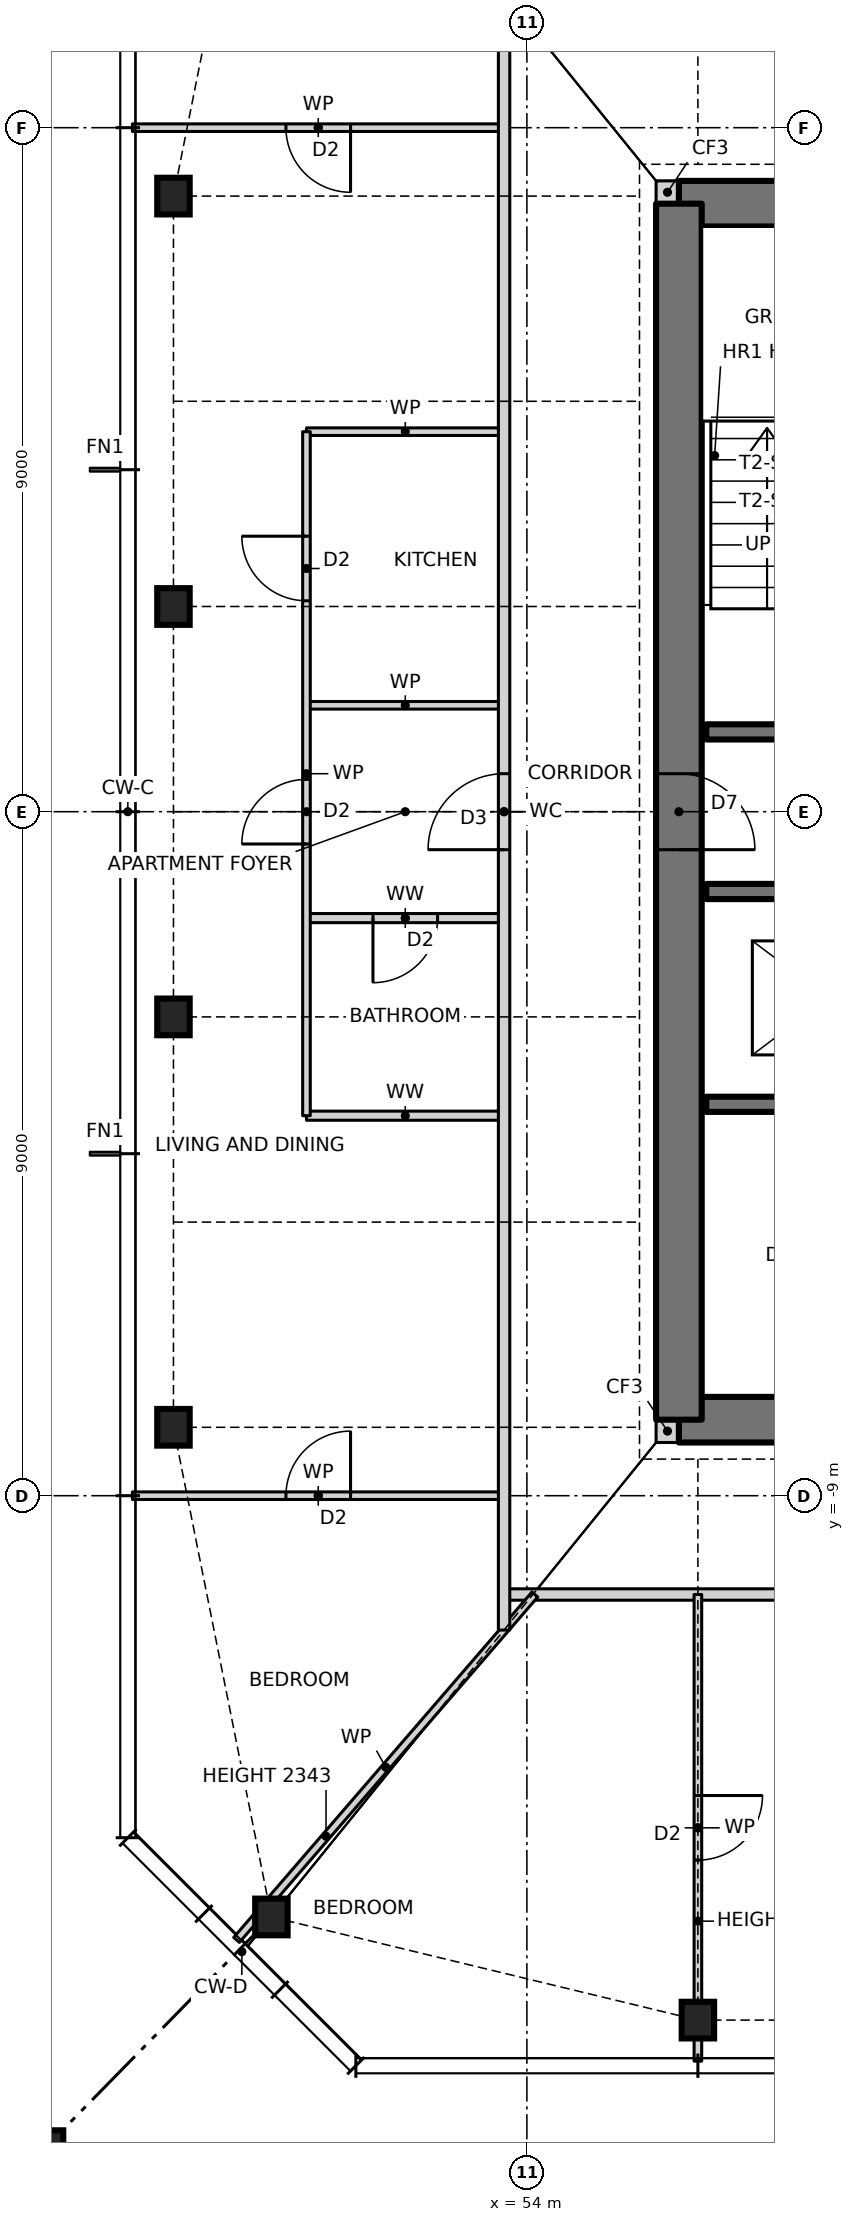
"""IFC4 building model, lengths in metres.
Left out: names, types, materials, properties, quantities, classifications, styles, units other than length and angle.
Written with IfcOpenShell. Run it as: python <this file> out.ifc"""

import sys

from ifc_helpers import new_model, si_unit, direction, frame, frame_2d, origin, origin_2d, place, context, subcontext, project, spatial, rectangle, hollow_rectangle, i_section, extrude, element, fill, save


model = new_model("IFC4")
c1 = context("Model", 3, precision=1e-05, world=origin(), true_north=direction((0.0, 1.0)))
c2 = subcontext(c1, "Body", "Model", "MODEL_VIEW")
j1 = project(units=[si_unit("LENGTHUNIT", "METRE"), si_unit("PLANEANGLEUNIT", "RADIAN")], contexts=[c1])
p1 = place(None, origin())
s1 = spatial("IfcSite", under=j1, at=p1, CompositionType="ELEMENT")
p2 = place(p1, origin())
s2 = spatial("IfcBuilding", under=s1, at=p2, CompositionType="ELEMENT")
p3 = place(p2, frame((0.0, 0.0, 94.5)))
s3 = spatial("IfcBuildingStorey", under=s2, at=p3, CompositionType="ELEMENT", Elevation=94.5)
for number, where, z_axis, x_axis in (
    (1, (50.639, -14.543, 0.0), (0.0, 0.0, 1.0), (1.0, 0.0, 0.0)),
    (2, (56.25, -15.9, 0.0), (0.0, 0.0, 1.0), (1.0, 0.0, 0.0)),
    (3, (49.35, 8.1, 0.0), (0.0, 0.0, 1.0), (1.0, 0.0, 0.0)),
    (4, (49.35, 2.7, 0.0), (0.0, 0.0, 1.0), (1.0, 0.0, 0.0)),
    (5, (49.35, -2.7, 0.0), (0.0, 0.0, 1.0), (1.0, 0.0, 0.0)),
    (6, (49.35, -8.1, 0.0), (0.0, 0.0, 1.0), (1.0, 0.0, 0.0)),
):
    element("IfcColumn", number, at=place(p3, frame(where, z_axis=z_axis, x_axis=x_axis)), inside=s3, PredefinedType="COLUMN", context=c2, shape_type="SweptSolid", body=[
        extrude(i_section(OverallWidth=0.427, OverallDepth=0.483, WebThickness=0.051, FlangeThickness=0.082, at=origin_2d()), origin(), (0.0, 0.0, 1.0), 3.5),
    ])
p4 = place(p3, frame((47.35, -17.9, 0.0), z_axis=(0.0, 0.0, 1.0), x_axis=(1.0, 0.0, 0.0)))
e7 = element("IfcColumn", 7, at=p4, inside=s3, PredefinedType="COLUMN", context=c2, shape_type="SweptSolid", body=[
    extrude(hollow_rectangle(XDim=1.1, YDim=1.1, WallThickness=0.06, at=origin_2d()), origin(), (0.0, 0.0, 1.0), 3.5),
])
for number, where, z_axis, x_axis in (
    (8, (55.7, -8.15, 0.0), (0.0, 0.0, 1.0), (1.0, 0.0, 0.0)),
    (9, (55.7, 8.15, 0.0), (0.0, 0.0, 1.0), (1.0, 0.0, 0.0)),
):
    element("IfcWall", number, at=place(p3, frame(where, z_axis=z_axis, x_axis=x_axis)), inside=s3, PredefinedType="SOLIDWALL", context=c2, shape_type="SweptSolid", body=[
        extrude(rectangle(XDim=0.3, YDim=0.3, at=frame_2d((0.15, 0.0))), origin(), (0.0, 0.0, 1.0), 3.5),
    ])
p5 = place(p3, frame((56.0, -8.0, 0.0), z_axis=(0.0, 0.0, 1.0), x_axis=(1.0, 0.0, 0.0)))
e10 = element("IfcWall", 10, at=p5, inside=s3, PredefinedType="SHEAR", context=c2, shape_type="SweptSolid", body=[
    extrude(rectangle(XDim=14.0, YDim=0.6, at=frame_2d((7.0, 0.0))), origin(), (0.0, 0.0, 1.0), 3.5),
])
p6 = place(p5, frame((2.7, 0.0, 0.0)))
e11 = element("IfcOpeningElement", 11, at=p6, cuts=e10, PredefinedType="OPENING", context=c2, shape_type="SweptSolid", body=[
    extrude(rectangle(XDim=0.9, YDim=2.1, at=frame_2d((0.45, 1.05))), frame((0.0, 0.31, 0.0), z_axis=(0.0, -1.0, 0.0), x_axis=(1.0, 0.0, 0.0)), (0.0, 0.0, 1.0), 0.62),
])
p7 = place(p5, frame((7.7, 0.0, 0.0)))
e12 = element("IfcOpeningElement", 12, at=p7, cuts=e10, PredefinedType="OPENING", context=c2, shape_type="SweptSolid", body=[
    extrude(rectangle(XDim=0.9, YDim=2.1, at=frame_2d((0.45, 1.05))), frame((0.0, 0.31, 0.0), z_axis=(0.0, -1.0, 0.0), x_axis=(1.0, 0.0, 0.0)), (0.0, 0.0, 1.0), 0.62),
])
p8 = place(p3, frame((70.0, 8.0, 0.0), z_axis=(0.0, 0.0, 1.0), x_axis=(-1.0, 0.0, 0.0)))
e13 = element("IfcWall", 13, at=p8, inside=s3, PredefinedType="SHEAR", context=c2, shape_type="SweptSolid", body=[
    extrude(rectangle(XDim=14.0, YDim=0.6, at=frame_2d((7.0, 0.0))), origin(), (0.0, 0.0, 1.0), 3.5),
])
p9 = place(p8, frame((8.2, 0.0, 0.0)))
e14 = element("IfcOpeningElement", 14, at=p9, cuts=e13, PredefinedType="OPENING", context=c2, shape_type="SweptSolid", body=[
    extrude(rectangle(XDim=0.9, YDim=2.1, at=frame_2d((0.45, 1.05))), frame((0.0, 0.31, 0.0), z_axis=(0.0, -1.0, 0.0), x_axis=(1.0, 0.0, 0.0)), (0.0, 0.0, 1.0), 0.62),
])
p10 = place(p8, frame((3.2, 0.0, 0.0)))
e15 = element("IfcOpeningElement", 15, at=p10, cuts=e13, PredefinedType="OPENING", context=c2, shape_type="SweptSolid", body=[
    extrude(rectangle(XDim=0.9, YDim=2.1, at=frame_2d((0.45, 1.05))), frame((0.0, 0.31, 0.0), z_axis=(0.0, -1.0, 0.0), x_axis=(1.0, 0.0, 0.0)), (0.0, 0.0, 1.0), 0.62),
])
p11 = place(p3, frame((56.0, 8.0, 0.0), z_axis=(0.0, 0.0, 1.0), x_axis=(0.0, -1.0, 0.0)))
e16 = element("IfcWall", 16, at=p11, inside=s3, PredefinedType="SHEAR", context=c2, shape_type="SweptSolid", body=[
    extrude(rectangle(XDim=16.0, YDim=0.6, at=frame_2d((8.0, 0.0))), origin(), (0.0, 0.0, 1.0), 3.5),
])
p12 = place(p11, frame((7.5, 0.0, 0.0)))
e17 = element("IfcOpeningElement", 17, at=p12, cuts=e16, PredefinedType="OPENING", context=c2, shape_type="SweptSolid", body=[
    extrude(rectangle(XDim=1.0, YDim=2.1, at=frame_2d((0.5, 1.05))), frame((0.0, 0.31, 0.0), z_axis=(0.0, -1.0, 0.0), x_axis=(1.0, 0.0, 0.0)), (0.0, 0.0, 1.0), 0.62),
])
p13 = place(p3, frame((53.7, -10.3, 0.0), z_axis=(0.0, 0.0, 1.0), x_axis=(1.0, 0.0, 0.0)))
e18 = element("IfcWall", 18, at=p13, inside=s3, PredefinedType="PARTITIONING", context=c2, shape_type="SweptSolid", body=[
    extrude(rectangle(XDim=18.6, YDim=0.15, at=frame_2d((9.3, 0.0))), origin(), (0.0, 0.0, 1.0), 3.27),
])
p14 = place(p13, frame((8.8, 0.0, 0.0)))
e19 = element("IfcOpeningElement", 19, at=p14, cuts=e18, PredefinedType="OPENING", context=c2, shape_type="SweptSolid", body=[
    extrude(rectangle(XDim=1.0, YDim=2.1, at=frame_2d((0.5, 1.05))), frame((0.0, 0.085, 0.0), z_axis=(0.0, -1.0, 0.0), x_axis=(1.0, 0.0, 0.0)), (0.0, 0.0, 1.0), 0.17),
])
p15 = place(p3, frame((48.81, -9.0, 0.0), z_axis=(0.0, 0.0, 1.0), x_axis=(1.0, 0.0, 0.0)))
e20 = element("IfcWall", 20, at=p15, inside=s3, PredefinedType="PARTITIONING", context=c2, shape_type="SweptSolid", body=[
    extrude(rectangle(XDim=4.89, YDim=0.1, at=frame_2d((2.445, 0.0))), origin(), (0.0, 0.0, 1.0), 3.27),
])
p16 = place(p15, frame((2.02, 0.0, 0.0)))
e21 = element("IfcOpeningElement", 21, at=p16, cuts=e20, PredefinedType="OPENING", context=c2, shape_type="SweptSolid", body=[
    extrude(rectangle(XDim=0.85, YDim=2.1, at=frame_2d((0.425, 1.05))), frame((0.0, 0.06, 0.0), z_axis=(0.0, -1.0, 0.0), x_axis=(1.0, 0.0, 0.0)), (0.0, 0.0, 1.0), 0.12),
])
p17 = place(p3, frame((51.1, -4.0, 0.0), z_axis=(0.0, 0.0, 1.0), x_axis=(1.0, 0.0, 0.0)))
e22 = element("IfcWall", 22, at=p17, inside=s3, PredefinedType="PARTITIONING", context=c2, shape_type="SweptSolid", body=[
    extrude(rectangle(XDim=2.6, YDim=0.12, at=frame_2d((1.3, 0.0))), origin(), (0.0, 0.0, 1.0), 3.27),
])
p18 = place(p3, frame((56.36, -3.85, 0.0), z_axis=(0.0, 0.0, 1.0), x_axis=(1.0, 0.0, 0.0)))
e23 = element("IfcWall", 23, at=p18, inside=s3, PredefinedType="SOLIDWALL", context=c2, shape_type="SweptSolid", body=[
    extrude(rectangle(XDim=9.94, YDim=0.2, at=frame_2d((4.97, 0.0))), origin(), (0.0, 0.0, 1.0), 3.5),
])
p19 = place(p3, frame((51.1, -1.4, 0.0), z_axis=(0.0, 0.0, 1.0), x_axis=(1.0, 0.0, 0.0)))
e24 = element("IfcWall", 24, at=p19, inside=s3, PredefinedType="PARTITIONING", context=c2, shape_type="SweptSolid", body=[
    extrude(rectangle(XDim=2.6, YDim=0.12, at=frame_2d((1.3, 0.0))), origin(), (0.0, 0.0, 1.0), 3.27),
])
p20 = place(p19, frame((0.875, 0.0, 0.0)))
e25 = element("IfcOpeningElement", 25, at=p20, cuts=e24, PredefinedType="OPENING", context=c2, shape_type="SweptSolid", body=[
    extrude(rectangle(XDim=0.85, YDim=2.1, at=frame_2d((0.425, 1.05))), frame((0.0, 0.07, 0.0), z_axis=(0.0, -1.0, 0.0), x_axis=(1.0, 0.0, 0.0)), (0.0, 0.0, 1.0), 0.14),
])
p21 = place(p3, frame((56.36, -1.05, 0.0), z_axis=(0.0, 0.0, 1.0), x_axis=(1.0, 0.0, 0.0)))
e26 = element("IfcWall", 26, at=p21, inside=s3, PredefinedType="SOLIDWALL", context=c2, shape_type="SweptSolid", body=[
    extrude(rectangle(XDim=13.28, YDim=0.2, at=frame_2d((6.64, 0.0))), origin(), (0.0, 0.0, 1.0), 3.5),
])
p22 = place(p21, frame((11.11, 0.0, 0.0)))
e27 = element("IfcOpeningElement", 27, at=p22, cuts=e26, PredefinedType="OPENING", context=c2, shape_type="SweptSolid", body=[
    extrude(rectangle(XDim=1.0, YDim=2.1, at=frame_2d((0.5, 1.05))), frame((0.0, 0.11, 0.0), z_axis=(0.0, -1.0, 0.0), x_axis=(1.0, 0.0, 0.0)), (0.0, 0.0, 1.0), 0.22),
])
p23 = place(p21, frame((1.087, 0.0, 0.0)))
e28 = element("IfcOpeningElement", 28, at=p23, cuts=e26, PredefinedType="OPENING", context=c2, shape_type="SweptSolid", body=[
    extrude(rectangle(XDim=1.1, YDim=2.1, at=frame_2d((0.55, 1.05))), frame((0.0, 0.11, 0.0), z_axis=(0.0, -1.0, 0.0), x_axis=(1.0, 0.0, 0.0)), (0.0, 0.0, 1.0), 0.22),
])
p24 = place(p21, frame((4.39, 0.0, 0.0)))
e29 = element("IfcOpeningElement", 29, at=p24, cuts=e26, PredefinedType="OPENING", context=c2, shape_type="SweptSolid", body=[
    extrude(rectangle(XDim=1.1, YDim=2.1, at=frame_2d((0.55, 1.05))), frame((0.0, 0.11, 0.0), z_axis=(0.0, -1.0, 0.0), x_axis=(1.0, 0.0, 0.0)), (0.0, 0.0, 1.0), 0.22),
])
p25 = place(p21, frame((7.724, 0.0, 0.0)))
e30 = element("IfcOpeningElement", 30, at=p25, cuts=e26, PredefinedType="OPENING", context=c2, shape_type="SweptSolid", body=[
    extrude(rectangle(XDim=1.1, YDim=2.1, at=frame_2d((0.55, 1.05))), frame((0.0, 0.11, 0.0), z_axis=(0.0, -1.0, 0.0), x_axis=(1.0, 0.0, 0.0)), (0.0, 0.0, 1.0), 0.22),
])
p26 = place(p3, frame((56.36, 1.05, 0.0), z_axis=(0.0, 0.0, 1.0), x_axis=(1.0, 0.0, 0.0)))
e31 = element("IfcWall", 31, at=p26, inside=s3, PredefinedType="SOLIDWALL", context=c2, shape_type="SweptSolid", body=[
    extrude(rectangle(XDim=13.28, YDim=0.2, at=frame_2d((6.64, 0.0))), origin(), (0.0, 0.0, 1.0), 3.5),
])
p27 = place(p26, frame((1.17, 0.0, 0.0)))
e32 = element("IfcOpeningElement", 32, at=p27, cuts=e31, PredefinedType="OPENING", context=c2, shape_type="SweptSolid", body=[
    extrude(rectangle(XDim=1.0, YDim=2.1, at=frame_2d((0.5, 1.05))), frame((0.0, 0.11, 0.0), z_axis=(0.0, -1.0, 0.0), x_axis=(1.0, 0.0, 0.0)), (0.0, 0.0, 1.0), 0.22),
])
p28 = place(p26, frame((6.19, 0.0, 0.0)))
e33 = element("IfcOpeningElement", 33, at=p28, cuts=e31, PredefinedType="OPENING", context=c2, shape_type="SweptSolid", body=[
    extrude(rectangle(XDim=0.9, YDim=2.1, at=frame_2d((0.45, 1.05))), frame((0.0, 0.11, 0.0), z_axis=(0.0, -1.0, 0.0), x_axis=(1.0, 0.0, 0.0)), (0.0, 0.0, 1.0), 0.22),
])
p29 = place(p26, frame((10.96, 0.0, 0.0)))
e34 = element("IfcOpeningElement", 34, at=p29, cuts=e31, PredefinedType="OPENING", context=c2, shape_type="SweptSolid", body=[
    extrude(rectangle(XDim=1.3, YDim=2.1, at=frame_2d((0.65, 1.05))), frame((0.0, 0.11, 0.0), z_axis=(0.0, -1.0, 0.0), x_axis=(1.0, 0.0, 0.0)), (0.0, 0.0, 1.0), 0.22),
])
for number, where, z_axis, x_axis in (
    (35, (51.1, 1.4, 0.0), (0.0, 0.0, 1.0), (1.0, 0.0, 0.0)),
    (36, (51.1, 5.0, 0.0), (0.0, 0.0, 1.0), (1.0, 0.0, 0.0)),
):
    element("IfcWall", number, at=place(p3, frame(where, z_axis=z_axis, x_axis=x_axis)), inside=s3, PredefinedType="PARTITIONING", context=c2, shape_type="SweptSolid", body=[
        extrude(rectangle(XDim=2.6, YDim=0.1, at=frame_2d((1.3, 0.0))), origin(), (0.0, 0.0, 1.0), 3.27),
    ])
p30 = place(p3, frame((48.81, 9.0, 0.0), z_axis=(0.0, 0.0, 1.0), x_axis=(1.0, 0.0, 0.0)))
e37 = element("IfcWall", 37, at=p30, inside=s3, PredefinedType="PARTITIONING", context=c2, shape_type="SweptSolid", body=[
    extrude(rectangle(XDim=4.89, YDim=0.1, at=frame_2d((2.445, 0.0))), origin(), (0.0, 0.0, 1.0), 3.27),
])
p31 = place(p30, frame((2.02, 0.0, 0.0)))
e38 = element("IfcOpeningElement", 38, at=p31, cuts=e37, PredefinedType="OPENING", context=c2, shape_type="SweptSolid", body=[
    extrude(rectangle(XDim=0.85, YDim=2.1, at=frame_2d((0.425, 1.05))), frame((0.0, 0.06, 0.0), z_axis=(0.0, -1.0, 0.0), x_axis=(1.0, 0.0, 0.0)), (0.0, 0.0, 1.0), 0.12),
])
p32 = place(p3, frame((50.18, -14.845, 0.0), z_axis=(0.0, 0.0, 1.0), x_axis=(0.653585997703, 0.756852260092, 0.0)))
e39 = element("IfcWall", 39, at=p32, inside=s3, PredefinedType="PARTITIONING", context=c2, shape_type="SweptSolid", body=[
    extrude(rectangle(XDim=6.005, YDim=0.1, at=frame_2d((3.002, 0.0))), origin(), (0.0, 0.0, 1.0), 2.343),
])
p33 = place(p3, frame((56.25, -16.44, 0.0), z_axis=(0.0, 0.0, 1.0), x_axis=(0.0, 1.0, 0.0)))
e40 = element("IfcWall", 40, at=p33, inside=s3, PredefinedType="PARTITIONING", context=c2, shape_type="SweptSolid", body=[
    extrude(rectangle(XDim=6.14, YDim=0.1, at=frame_2d((3.07, 0.0))), origin(), (0.0, 0.0, 1.0), 2.498),
])
p34 = place(p33, frame((2.645, 0.0, 0.0)))
e41 = element("IfcOpeningElement", 41, at=p34, cuts=e40, PredefinedType="OPENING", context=c2, shape_type="SweptSolid", body=[
    extrude(rectangle(XDim=0.85, YDim=2.1, at=frame_2d((0.425, 1.05))), frame((0.0, 0.06, 0.0), z_axis=(0.0, -1.0, 0.0), x_axis=(1.0, 0.0, 0.0)), (0.0, 0.0, 1.0), 0.12),
])
p35 = place(p3, frame((53.7, -10.768, 0.0), z_axis=(0.0, 0.0, 1.0), x_axis=(0.0, 1.0, 0.0)))
e42 = element("IfcWall", 42, at=p35, inside=s3, PredefinedType="PARTITIONING", context=c2, shape_type="SweptSolid", body=[
    extrude(rectangle(XDim=21.536, YDim=0.15, at=frame_2d((10.768, 0.0))), origin(), (0.0, 0.0, 1.0), 3.27),
])
p36 = place(p35, frame((10.268, 0.0, 0.0)))
e43 = element("IfcOpeningElement", 43, at=p36, cuts=e42, PredefinedType="OPENING", context=c2, shape_type="SweptSolid", body=[
    extrude(rectangle(XDim=1.0, YDim=2.1, at=frame_2d((0.5, 1.05))), frame((0.0, 0.085, 0.0), z_axis=(0.0, -1.0, 0.0), x_axis=(1.0, 0.0, 0.0)), (0.0, 0.0, 1.0), 0.17),
])
p37 = place(p3, frame((51.1, -4.0, 0.0), z_axis=(0.0, 0.0, 1.0), x_axis=(0.0, 1.0, 0.0)))
e44 = element("IfcWall", 44, at=p37, inside=s3, PredefinedType="PARTITIONING", context=c2, shape_type="SweptSolid", body=[
    extrude(rectangle(XDim=9.0, YDim=0.1, at=frame_2d((4.5, 0.0))), origin(), (0.0, 0.0, 1.0), 3.27),
])
p38 = place(p37, frame((6.775, 0.0, 0.0)))
e45 = element("IfcOpeningElement", 45, at=p38, cuts=e44, PredefinedType="OPENING", context=c2, shape_type="SweptSolid", body=[
    extrude(rectangle(XDim=0.85, YDim=2.1, at=frame_2d((0.425, 1.05))), frame((0.0, 0.06, 0.0), z_axis=(0.0, -1.0, 0.0), x_axis=(1.0, 0.0, 0.0)), (0.0, 0.0, 1.0), 0.12),
])
p39 = place(p37, frame((3.575, 0.0, 0.0)))
e46 = element("IfcOpeningElement", 46, at=p39, cuts=e44, PredefinedType="OPENING", context=c2, shape_type="SweptSolid", body=[
    extrude(rectangle(XDim=0.85, YDim=2.1, at=frame_2d((0.425, 1.05))), frame((0.0, 0.06, 0.0), z_axis=(0.0, -1.0, 0.0), x_axis=(1.0, 0.0, 0.0)), (0.0, 0.0, 1.0), 0.12),
])
p40 = place(p34, frame((0.85, 0.0, 0.0), z_axis=(0.0, 0.0, 1.0), x_axis=(-1.0, 0.0, 0.0)))
e47 = element("IfcDoor", 47, at=p40, inside=s3, OperationType="SINGLE_SWING_LEFT", PredefinedType="DOOR", context=c2, shape_type="SweptSolid", body=[
    extrude(rectangle(XDim=0.85, YDim=2.1, at=frame_2d((0.425, 1.05))), frame((0.0, 0.025, 0.0), z_axis=(0.0, -1.0, 0.0), x_axis=(1.0, 0.0, 0.0)), (0.0, 0.0, 1.0), 0.05),
])
fill(e41, e47)
p41 = place(p38, origin())
e48 = element("IfcDoor", 48, at=p41, inside=s3, OperationType="SINGLE_SWING_RIGHT", PredefinedType="DOOR", context=c2, shape_type="SweptSolid", body=[
    extrude(rectangle(XDim=0.85, YDim=2.1, at=frame_2d((0.425, 1.05))), frame((0.0, 0.025, 0.0), z_axis=(0.0, -1.0, 0.0), x_axis=(1.0, 0.0, 0.0)), (0.0, 0.0, 1.0), 0.05),
])
fill(e45, e48)
p42 = place(p36, origin())
e49 = element("IfcDoor", 49, at=p42, inside=s3, OperationType="SINGLE_SWING_LEFT", PredefinedType="DOOR", context=c2, shape_type="SweptSolid", body=[
    extrude(rectangle(XDim=1.0, YDim=2.1, at=frame_2d((0.5, 1.05))), frame((0.0, 0.025, 0.0), z_axis=(0.0, -1.0, 0.0), x_axis=(1.0, 0.0, 0.0)), (0.0, 0.0, 1.0), 0.05),
])
fill(e43, e49)
p43 = place(p39, origin())
e50 = element("IfcDoor", 50, at=p43, inside=s3, OperationType="SINGLE_SWING_LEFT", PredefinedType="DOOR", context=c2, shape_type="SweptSolid", body=[
    extrude(rectangle(XDim=0.85, YDim=2.1, at=frame_2d((0.425, 1.05))), frame((0.0, 0.025, 0.0), z_axis=(0.0, -1.0, 0.0), x_axis=(1.0, 0.0, 0.0)), (0.0, 0.0, 1.0), 0.05),
])
fill(e46, e50)
p44 = place(p20, frame((0.85, 0.0, 0.0), z_axis=(0.0, 0.0, 1.0), x_axis=(-1.0, 0.0, 0.0)))
e51 = element("IfcDoor", 51, at=p44, inside=s3, OperationType="SINGLE_SWING_RIGHT", PredefinedType="DOOR", context=c2, shape_type="SweptSolid", body=[
    extrude(rectangle(XDim=0.85, YDim=2.1, at=frame_2d((0.425, 1.05))), frame((0.0, 0.025, 0.0), z_axis=(0.0, -1.0, 0.0), x_axis=(1.0, 0.0, 0.0)), (0.0, 0.0, 1.0), 0.05),
])
fill(e25, e51)
p45 = place(p31, frame((0.85, 0.0, 0.0), z_axis=(0.0, 0.0, 1.0), x_axis=(-1.0, 0.0, 0.0)))
e52 = element("IfcDoor", 52, at=p45, inside=s3, OperationType="SINGLE_SWING_LEFT", PredefinedType="DOOR", context=c2, shape_type="SweptSolid", body=[
    extrude(rectangle(XDim=0.85, YDim=2.1, at=frame_2d((0.425, 1.05))), frame((0.0, 0.025, 0.0), z_axis=(0.0, -1.0, 0.0), x_axis=(1.0, 0.0, 0.0)), (0.0, 0.0, 1.0), 0.05),
])
fill(e38, e52)
p46 = place(p16, origin())
e53 = element("IfcDoor", 53, at=p46, inside=s3, OperationType="SINGLE_SWING_RIGHT", PredefinedType="DOOR", context=c2, shape_type="SweptSolid", body=[
    extrude(rectangle(XDim=0.85, YDim=2.1, at=frame_2d((0.425, 1.05))), frame((0.0, 0.025, 0.0), z_axis=(0.0, -1.0, 0.0), x_axis=(1.0, 0.0, 0.0)), (0.0, 0.0, 1.0), 0.05),
])
fill(e21, e53)
p47 = place(p12, origin())
e54 = element("IfcDoor", 54, at=p47, inside=s3, OperationType="SINGLE_SWING_RIGHT", PredefinedType="DOOR", context=c2, shape_type="SweptSolid", body=[
    extrude(rectangle(XDim=1.0, YDim=2.1, at=frame_2d((0.5, 1.05))), frame((0.0, 0.025, 0.0), z_axis=(0.0, -1.0, 0.0), x_axis=(1.0, 0.0, 0.0)), (0.0, 0.0, 1.0), 0.05),
])
fill(e17, e54)
save(model, sys.argv[1])
